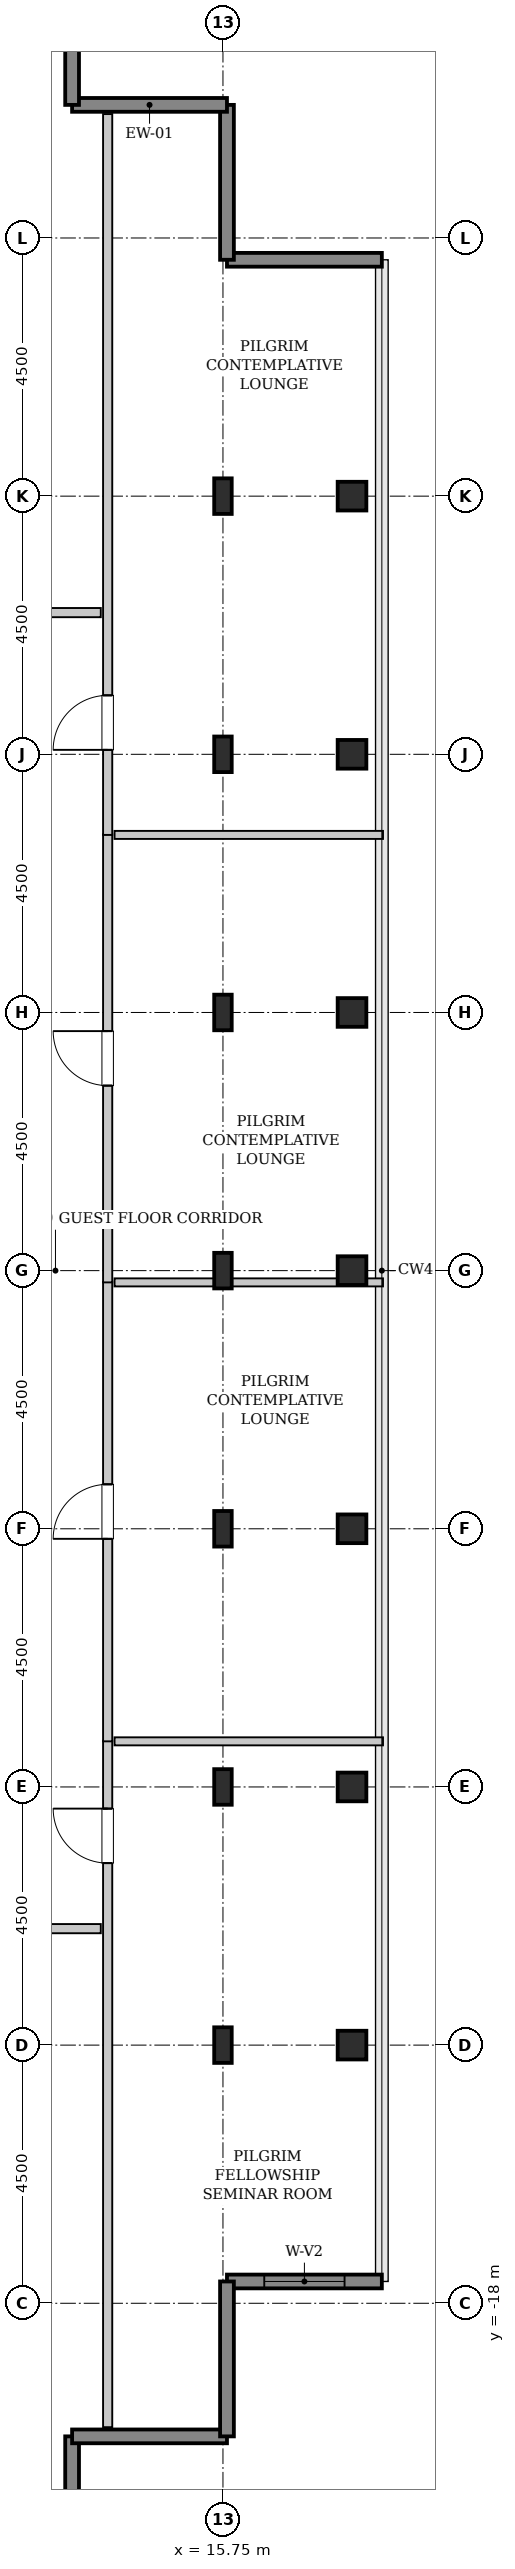
"""IFC4 building model, lengths in metres.
Left out: names, types, materials, properties, quantities, classifications, styles, units other than length and angle.
Written with IfcOpenShell. Run it as: python <this file> out.ifc"""

import sys

from ifc_helpers import new_model, si_unit, direction, frame, frame_2d, origin, origin_2d, place, context, subcontext, project, spatial, rectangle, hollow_rectangle, i_section, extrude, source, transform, mapped, element, fill, save


model = new_model("IFC4")
c1 = context("Model", 3, precision=1e-05, world=origin(), true_north=direction((0.0, 1.0)))
c2 = subcontext(c1, "Body", "Model", "MODEL_VIEW")
j1 = project(units=[si_unit("LENGTHUNIT", "METRE"), si_unit("PLANEANGLEUNIT", "RADIAN")], contexts=[c1])
p1 = place(None, origin())
s1 = spatial("IfcSite", under=j1, at=p1, CompositionType="ELEMENT")
p2 = place(p1, origin())
s2 = spatial("IfcBuilding", under=s1, at=p2, CompositionType="ELEMENT")
p3 = place(p2, frame((0.0, 0.0, 314.0)))
s3 = spatial("IfcBuildingStorey", under=s2, at=p3, CompositionType="ELEMENT", Elevation=314.0)
m1 = source(origin(), c2, "Body", "SweptSolid", [
    extrude(i_section(OverallWidth=0.305, OverallDepth=0.62, WebThickness=0.021, FlangeThickness=0.04, FilletRadius=0.027, at=origin_2d()), origin(), (0.0, 0.0, 1.0), 3.8),
])
for number, where, z_axis, x_axis in (
    (1, (15.75, -13.5, 0.0), (0.0, 0.0, 1.0), (1.0, 0.0, 0.0)),
    (2, (15.75, -9.0, 0.0), (0.0, 0.0, 1.0), (1.0, 0.0, 0.0)),
    (3, (15.75, -4.5, 0.0), (0.0, 0.0, 1.0), (1.0, 0.0, 0.0)),
    (4, (15.75, 0.0, 0.0), (0.0, 0.0, 1.0), (1.0, 0.0, 0.0)),
    (5, (15.75, 4.5, 0.0), (0.0, 0.0, 1.0), (1.0, 0.0, 0.0)),
    (6, (15.75, 9.0, 0.0), (0.0, 0.0, 1.0), (1.0, 0.0, 0.0)),
    (7, (15.75, 13.5, 0.0), (0.0, 0.0, 1.0), (1.0, 0.0, 0.0)),
):
    element("IfcColumn", number, at=place(p3, frame(where, z_axis=z_axis, x_axis=x_axis)), inside=s3, PredefinedType="COLUMN", context=c2, shape_type="MappedRepresentation", body=[
        mapped(m1, transform((0.0, 0.0, 0.0), x_axis=(1.0, 0.0, 0.0), y_axis=(0.0, 1.0, 0.0), z_axis=(0.0, 0.0, 1.0), scale=1.0)),
    ])
m2 = source(origin(), c2, "Body", "SweptSolid", [
    extrude(hollow_rectangle(XDim=0.5, YDim=0.5, WallThickness=0.025, InnerFilletRadius=0.025, OuterFilletRadius=0.05, at=origin_2d()), origin(), (0.0, 0.0, 1.0), 3.8),
])
for number, where, z_axis, x_axis in (
    (8, (18.0, -13.5, 0.0), (0.0, 0.0, 1.0), (1.0, 0.0, 0.0)),
    (9, (18.0, -9.0, 0.0), (0.0, 0.0, 1.0), (1.0, 0.0, 0.0)),
    (10, (18.0, -4.5, 0.0), (0.0, 0.0, 1.0), (1.0, 0.0, 0.0)),
    (11, (18.0, 0.0, 0.0), (0.0, 0.0, 1.0), (1.0, 0.0, 0.0)),
    (12, (18.0, 4.5, 0.0), (0.0, 0.0, 1.0), (1.0, 0.0, 0.0)),
    (13, (18.0, 9.0, 0.0), (0.0, 0.0, 1.0), (1.0, 0.0, 0.0)),
    (14, (18.0, 13.5, 0.0), (0.0, 0.0, 1.0), (1.0, 0.0, 0.0)),
):
    element("IfcColumn", number, at=place(p3, frame(where, z_axis=z_axis, x_axis=x_axis)), inside=s3, PredefinedType="COLUMN", context=c2, shape_type="MappedRepresentation", body=[
        mapped(m2, transform((0.0, 0.0, 0.0), x_axis=(1.0, 0.0, 0.0), y_axis=(0.0, 1.0, 0.0), z_axis=(0.0, 0.0, 1.0), scale=1.0)),
    ])
m3 = source(origin(), c2, "Body", "SweptSolid", [
    extrude(rectangle(XDim=2.7, YDim=0.24, at=frame_2d((1.35, 0.0))), origin(), (0.0, 0.0, 1.0), 3.5),
])
p4 = place(p3, frame((15.82, -17.62, 0.0), z_axis=(0.0, 0.0, 1.0), x_axis=(1.0, 0.0, 0.0)))
e15 = element("IfcWall", 15, at=p4, inside=s3, PredefinedType="SHEAR", context=c2, shape_type="MappedRepresentation", body=[
    mapped(m3, transform((0.0, 0.0, 0.0), x_axis=(1.0, 0.0, 0.0), y_axis=(0.0, 1.0, 0.0), z_axis=(0.0, 0.0, 1.0), scale=1.0)),
])
p5 = place(p4, frame((0.65, 0.0, 0.85)))
e16 = element("IfcOpeningElement", 16, at=p5, cuts=e15, PredefinedType="OPENING", context=c2, shape_type="SweptSolid", body=[
    extrude(rectangle(XDim=1.4, YDim=1.8, at=frame_2d((0.7, 0.9))), frame((0.0, 0.13, 0.0), z_axis=(0.0, -1.0, 0.0), x_axis=(1.0, 0.0, 0.0)), (0.0, 0.0, 1.0), 0.26),
])
for number, where, z_axis, x_axis in (
    (17, (18.52, 17.62, 0.0), (0.0, 0.0, 1.0), (-1.0, 0.0, 0.0)),
    (18, (15.82, 17.62, 0.0), (0.0, 0.0, 1.0), (0.0, 1.0, 0.0)),
    (19, (15.82, 20.32, 0.0), (0.0, 0.0, 1.0), (-1.0, 0.0, 0.0)),
    (20, (13.12, 20.32, 0.0), (0.0, 0.0, 1.0), (0.0, 1.0, 0.0)),
    (21, (13.12, -23.02, 0.0), (0.0, 0.0, 1.0), (0.0, 1.0, 0.0)),
    (22, (13.12, -20.32, 0.0), (0.0, 0.0, 1.0), (1.0, 0.0, 0.0)),
    (23, (15.82, -20.32, 0.0), (0.0, 0.0, 1.0), (0.0, 1.0, 0.0)),
):
    element("IfcWall", number, at=place(p3, frame(where, z_axis=z_axis, x_axis=x_axis)), inside=s3, PredefinedType="SHEAR", context=c2, shape_type="MappedRepresentation", body=[
        mapped(m3, transform((0.0, 0.0, 0.0), x_axis=(1.0, 0.0, 0.0), y_axis=(0.0, 1.0, 0.0), z_axis=(0.0, 0.0, 1.0), scale=1.0)),
    ])
m4 = source(origin(), c2, "Body", "SweptSolid", [
    extrude(rectangle(XDim=11.965, YDim=0.16, at=frame_2d((5.982, 0.0))), origin(), (0.0, 0.0, 1.0), 3.485),
])
p6 = place(p3, frame((13.74, -20.16, 0.0), z_axis=(0.0, 0.0, 1.0), x_axis=(0.0, 1.0, 0.0)))
e24 = element("IfcWall", 24, at=p6, inside=s3, PredefinedType="PARTITIONING", context=c2, shape_type="MappedRepresentation", body=[
    mapped(m4, transform((0.0, 0.0, 0.0), x_axis=(1.0, 0.0, 0.0), y_axis=(0.0, 1.0, 0.0), z_axis=(0.0, 0.0, 1.0), scale=1.0)),
])
p7 = place(p6, frame((9.833, 0.0, 0.0)))
e25 = element("IfcOpeningElement", 25, at=p7, cuts=e24, PredefinedType="OPENING", context=c2, shape_type="SweptSolid", body=[
    extrude(rectangle(XDim=0.95, YDim=2.1, at=frame_2d((0.475, 1.05))), frame((0.0, 0.09, 0.0), z_axis=(0.0, -1.0, 0.0), x_axis=(1.0, 0.0, 0.0)), (0.0, 0.0, 1.0), 0.18),
])
m5 = source(origin(), c2, "Body", "SweptSolid", [
    extrude(rectangle(XDim=4.68, YDim=0.14, at=frame_2d((2.34, 0.0))), origin(), (0.0, 0.0, 1.0), 3.485),
])
p8 = place(p3, frame((13.86, -8.205, 0.0), z_axis=(0.0, 0.0, 1.0), x_axis=(1.0, 0.0, 0.0)))
e26 = element("IfcWall", 26, at=p8, inside=s3, PredefinedType="PARTITIONING", context=c2, shape_type="MappedRepresentation", body=[
    mapped(m5, transform((0.0, 0.0, 0.0), x_axis=(1.0, 0.0, 0.0), y_axis=(0.0, 1.0, 0.0), z_axis=(0.0, 0.0, 1.0), scale=1.0)),
])
m6 = source(origin(), c2, "Body", "SweptSolid", [
    extrude(rectangle(XDim=8.01, YDim=0.16, at=frame_2d((4.005, 0.0))), origin(), (0.0, 0.0, 1.0), 3.485),
])
p9 = place(p3, frame((13.74, -8.205, 0.0), z_axis=(0.0, 0.0, 1.0), x_axis=(0.0, 1.0, 0.0)))
e27 = element("IfcWall", 27, at=p9, inside=s3, PredefinedType="PARTITIONING", context=c2, shape_type="MappedRepresentation", body=[
    mapped(m6, transform((0.0, 0.0, 0.0), x_axis=(1.0, 0.0, 0.0), y_axis=(0.0, 1.0, 0.0), z_axis=(0.0, 0.0, 1.0), scale=1.0)),
])
p10 = place(p9, frame((3.53, 0.0, 0.0)))
e28 = element("IfcOpeningElement", 28, at=p10, cuts=e27, PredefinedType="OPENING", context=c2, shape_type="SweptSolid", body=[
    extrude(rectangle(XDim=0.95, YDim=2.1, at=frame_2d((0.475, 1.05))), frame((0.0, 0.09, 0.0), z_axis=(0.0, -1.0, 0.0), x_axis=(1.0, 0.0, 0.0)), (0.0, 0.0, 1.0), 0.18),
])
m7 = source(origin(), c2, "Body", "SweptSolid", [
    extrude(rectangle(XDim=4.68, YDim=0.14, at=frame_2d((2.34, 0.0))), origin(), (0.0, 0.0, 1.0), 2.925),
])
p11 = place(p3, frame((13.86, -0.205, 0.0), z_axis=(0.0, 0.0, 1.0), x_axis=(1.0, 0.0, 0.0)))
e29 = element("IfcWall", 29, at=p11, inside=s3, PredefinedType="PARTITIONING", context=c2, shape_type="MappedRepresentation", body=[
    mapped(m7, transform((0.0, 0.0, 0.0), x_axis=(1.0, 0.0, 0.0), y_axis=(0.0, 1.0, 0.0), z_axis=(0.0, 0.0, 1.0), scale=1.0)),
])
m8 = source(origin(), c2, "Body", "SweptSolid", [
    extrude(rectangle(XDim=7.81, YDim=0.16, at=frame_2d((3.905, 0.0))), origin(), (0.0, 0.0, 1.0), 3.485),
])
p12 = place(p3, frame((13.74, -0.205, 0.0), z_axis=(0.0, 0.0, 1.0), x_axis=(0.0, 1.0, 0.0)))
e30 = element("IfcWall", 30, at=p12, inside=s3, PredefinedType="PARTITIONING", context=c2, shape_type="MappedRepresentation", body=[
    mapped(m8, transform((0.0, 0.0, 0.0), x_axis=(1.0, 0.0, 0.0), y_axis=(0.0, 1.0, 0.0), z_axis=(0.0, 0.0, 1.0), scale=1.0)),
])
p13 = place(p12, frame((3.43, 0.0, 0.0)))
e31 = element("IfcOpeningElement", 31, at=p13, cuts=e30, PredefinedType="OPENING", context=c2, shape_type="SweptSolid", body=[
    extrude(rectangle(XDim=0.95, YDim=2.1, at=frame_2d((0.475, 1.05))), frame((0.0, 0.09, 0.0), z_axis=(0.0, -1.0, 0.0), x_axis=(1.0, 0.0, 0.0)), (0.0, 0.0, 1.0), 0.18),
])
p14 = place(p3, frame((13.86, 7.595, 0.0), z_axis=(0.0, 0.0, 1.0), x_axis=(1.0, 0.0, 0.0)))
e32 = element("IfcWall", 32, at=p14, inside=s3, PredefinedType="PARTITIONING", context=c2, shape_type="MappedRepresentation", body=[
    mapped(m5, transform((0.0, 0.0, 0.0), x_axis=(1.0, 0.0, 0.0), y_axis=(0.0, 1.0, 0.0), z_axis=(0.0, 0.0, 1.0), scale=1.0)),
])
m9 = source(origin(), c2, "Body", "SweptSolid", [
    extrude(rectangle(XDim=12.565, YDim=0.16, at=frame_2d((6.282, 0.0))), origin(), (0.0, 0.0, 1.0), 3.485),
])
p15 = place(p3, frame((13.74, 7.595, 0.0), z_axis=(0.0, 0.0, 1.0), x_axis=(0.0, 1.0, 0.0)))
e33 = element("IfcWall", 33, at=p15, inside=s3, PredefinedType="PARTITIONING", context=c2, shape_type="MappedRepresentation", body=[
    mapped(m9, transform((0.0, 0.0, 0.0), x_axis=(1.0, 0.0, 0.0), y_axis=(0.0, 1.0, 0.0), z_axis=(0.0, 0.0, 1.0), scale=1.0)),
])
p16 = place(p15, frame((1.482, 0.0, 0.0)))
e34 = element("IfcOpeningElement", 34, at=p16, cuts=e33, PredefinedType="OPENING", context=c2, shape_type="SweptSolid", body=[
    extrude(rectangle(XDim=0.95, YDim=2.1, at=frame_2d((0.475, 1.05))), frame((0.0, 0.09, 0.0), z_axis=(0.0, -1.0, 0.0), x_axis=(1.0, 0.0, 0.0)), (0.0, 0.0, 1.0), 0.18),
])
m10 = source(origin(), c2, "Body", "SweptSolid", [
    extrude(rectangle(XDim=4.86, YDim=0.16, at=frame_2d((2.43, 0.0))), origin(), (0.0, 0.0, 1.0), 3.485),
])
p17 = place(p3, frame((8.76, 11.47, 0.0), z_axis=(0.0, 0.0, 1.0), x_axis=(1.0, 0.0, 0.0)))
e35 = element("IfcWall", 35, at=p17, inside=s3, PredefinedType="PARTITIONING", context=c2, shape_type="MappedRepresentation", body=[
    mapped(m10, transform((0.0, 0.0, 0.0), x_axis=(1.0, 0.0, 0.0), y_axis=(0.0, 1.0, 0.0), z_axis=(0.0, 0.0, 1.0), scale=1.0)),
])
p18 = place(p17, frame((1.955, 0.0, 0.0)))
e36 = element("IfcOpeningElement", 36, at=p18, cuts=e35, PredefinedType="OPENING", context=c2, shape_type="SweptSolid", body=[
    extrude(rectangle(XDim=0.95, YDim=2.1, at=frame_2d((0.475, 1.05))), frame((0.0, 0.09, 0.0), z_axis=(0.0, -1.0, 0.0), x_axis=(1.0, 0.0, 0.0)), (0.0, 0.0, 1.0), 0.18),
])
m11 = source(origin(), c2, "Body", "SweptSolid", [
    extrude(rectangle(XDim=4.46, YDim=0.16, at=frame_2d((2.23, 0.0))), origin(), (0.0, 0.0, 1.0), 3.485),
])
p19 = place(p3, frame((9.16, -11.47, 0.0), z_axis=(0.0, 0.0, 1.0), x_axis=(1.0, 0.0, 0.0)))
e37 = element("IfcWall", 37, at=p19, inside=s3, PredefinedType="PARTITIONING", context=c2, shape_type="MappedRepresentation", body=[
    mapped(m11, transform((0.0, 0.0, 0.0), x_axis=(1.0, 0.0, 0.0), y_axis=(0.0, 1.0, 0.0), z_axis=(0.0, 0.0, 1.0), scale=1.0)),
])
p20 = place(p19, frame((1.755, 0.0, 0.0)))
e38 = element("IfcOpeningElement", 38, at=p20, cuts=e37, PredefinedType="OPENING", context=c2, shape_type="SweptSolid", body=[
    extrude(rectangle(XDim=0.95, YDim=2.1, at=frame_2d((0.475, 1.05))), frame((0.0, 0.09, 0.0), z_axis=(0.0, -1.0, 0.0), x_axis=(1.0, 0.0, 0.0)), (0.0, 0.0, 1.0), 0.18),
])
m12 = source(origin(), c2, "Body", "SweptSolid", [
    extrude(rectangle(XDim=1.4, YDim=1.8, at=frame_2d((0.7, 0.9))), frame((0.0, 0.03, 0.0), z_axis=(0.0, -1.0, 0.0), x_axis=(1.0, 0.0, 0.0)), (0.0, 0.0, 1.0), 0.06),
])
p21 = place(p5, origin())
e39 = element("IfcWindow", 39, at=p21, inside=s3, PartitioningType="SINGLE_PANEL", PredefinedType="WINDOW", context=c2, shape_type="MappedRepresentation", body=[
    mapped(m12, transform((0.0, 0.0, 0.0), x_axis=(1.0, 0.0, 0.0), y_axis=(0.0, 1.0, 0.0), z_axis=(0.0, 0.0, 1.0), scale=1.0)),
])
fill(e16, e39)
m13 = source(origin(), c2, "Body", "SweptSolid", [
    extrude(rectangle(XDim=0.95, YDim=2.1, at=frame_2d((0.475, 1.05))), frame((0.0, 0.025, 0.0), z_axis=(0.0, -1.0, 0.0), x_axis=(1.0, 0.0, 0.0)), (0.0, 0.0, 1.0), 0.05),
])
p22 = place(p7, origin())
e40 = element("IfcDoor", 40, at=p22, inside=s3, OperationType="SINGLE_SWING_RIGHT", PredefinedType="DOOR", context=c2, shape_type="MappedRepresentation", body=[
    mapped(m13, transform((0.0, 0.0, 0.0), x_axis=(1.0, 0.0, 0.0), y_axis=(0.0, 1.0, 0.0), z_axis=(0.0, 0.0, 1.0), scale=1.0)),
])
fill(e25, e40)
p23 = place(p10, origin())
e41 = element("IfcDoor", 41, at=p23, inside=s3, OperationType="SINGLE_SWING_LEFT", PredefinedType="DOOR", context=c2, shape_type="MappedRepresentation", body=[
    mapped(m13, transform((0.0, 0.0, 0.0), x_axis=(1.0, 0.0, 0.0), y_axis=(0.0, 1.0, 0.0), z_axis=(0.0, 0.0, 1.0), scale=1.0)),
])
fill(e28, e41)
p24 = place(p13, origin())
e42 = element("IfcDoor", 42, at=p24, inside=s3, OperationType="SINGLE_SWING_RIGHT", PredefinedType="DOOR", context=c2, shape_type="MappedRepresentation", body=[
    mapped(m13, transform((0.0, 0.0, 0.0), x_axis=(1.0, 0.0, 0.0), y_axis=(0.0, 1.0, 0.0), z_axis=(0.0, 0.0, 1.0), scale=1.0)),
])
fill(e31, e42)
p25 = place(p16, origin())
e43 = element("IfcDoor", 43, at=p25, inside=s3, OperationType="SINGLE_SWING_LEFT", PredefinedType="DOOR", context=c2, shape_type="MappedRepresentation", body=[
    mapped(m13, transform((0.0, 0.0, 0.0), x_axis=(1.0, 0.0, 0.0), y_axis=(0.0, 1.0, 0.0), z_axis=(0.0, 0.0, 1.0), scale=1.0)),
])
fill(e34, e43)
save(model, sys.argv[1])
